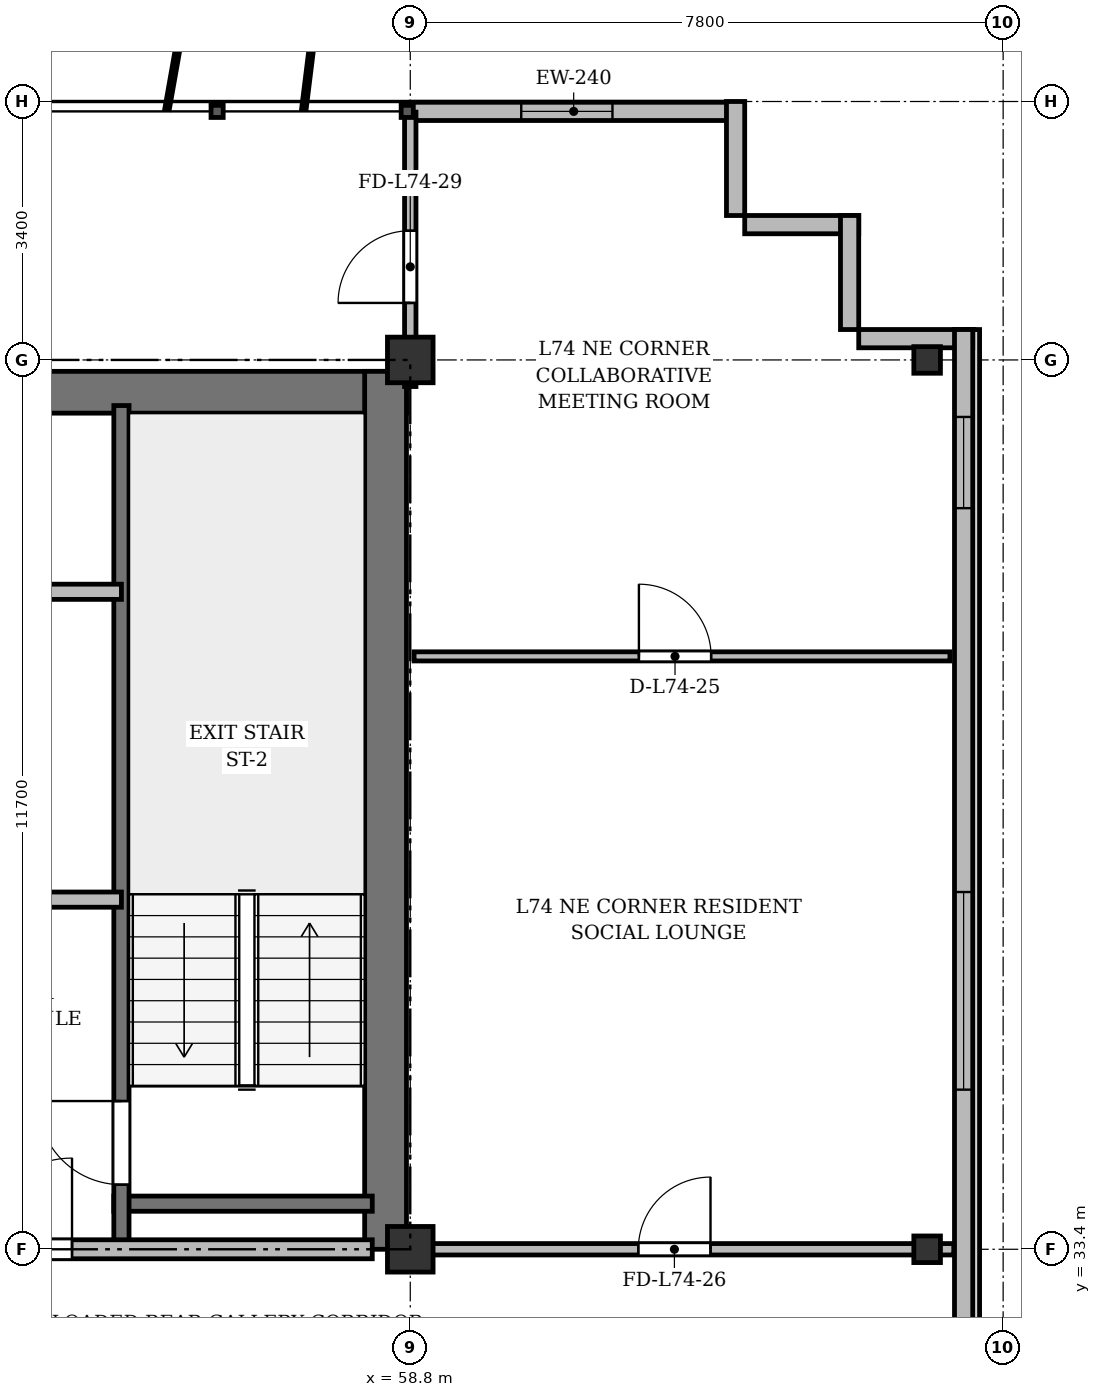
"""IFC4 building model, lengths in metres.
Left out: names, types, materials, properties, quantities, classifications, styles, units other than length and angle.
Written with IfcOpenShell. Run it as: python <this file> out.ifc"""

import sys

from ifc_helpers import new_model, si_unit, direction, frame, frame_2d, origin, origin_2d, place, context, subcontext, project, spatial, rectangle, i_section, extrude, source, transform, mapped, element, fill, save


model = new_model("IFC4")
c1 = context("Model", 3, precision=1e-05, world=origin(), true_north=direction((0.0, 1.0)))
c2 = subcontext(c1, "Body", "Model", "MODEL_VIEW")
j1 = project(units=[si_unit("LENGTHUNIT", "METRE"), si_unit("PLANEANGLEUNIT", "RADIAN")], contexts=[c1])
p1 = place(None, origin())
s1 = spatial("IfcSite", under=j1, at=p1, CompositionType="ELEMENT")
p2 = place(p1, origin())
s2 = spatial("IfcBuilding", under=s1, at=p2, CompositionType="ELEMENT")
p3 = place(p2, frame((0.0, 0.0, 284.7)))
s3 = spatial("IfcBuildingStorey", under=s2, at=p3, CompositionType="ELEMENT", Elevation=284.7)
m1 = source(origin(), c2, "Body", "SweptSolid", [
    extrude(rectangle(XDim=0.6, YDim=0.6, at=origin_2d()), origin(), (0.0, 0.0, 1.0), 3.6),
])
for number, where, z_axis, x_axis in (
    (1, (58.8, 33.4, 0.0), (0.0, 0.0, 1.0), (1.0, 0.0, 0.0)),
    (2, (58.8, 45.1, 0.0), (0.0, 0.0, 1.0), (1.0, 0.0, 0.0)),
):
    element("IfcColumn", number, at=place(p3, frame(where, z_axis=z_axis, x_axis=x_axis)), inside=s3, PredefinedType="COLUMN", context=c2, shape_type="MappedRepresentation", body=[
        mapped(m1, transform((0.0, 0.0, 0.0), x_axis=(1.0, 0.0, 0.0), y_axis=(0.0, 1.0, 0.0), z_axis=(0.0, 0.0, 1.0), scale=1.0)),
    ])
m2 = source(origin(), c2, "Body", "SweptSolid", [
    extrude(i_section(OverallWidth=0.35, OverallDepth=0.35, WebThickness=0.018, FlangeThickness=0.028, at=origin_2d()), origin(), (0.0, 0.0, 1.0), 3.6),
])
for number, where, z_axis, x_axis in (
    (3, (65.6, 33.4, 0.0), (0.0, 0.0, 1.0), (1.0, 0.0, 0.0)),
    (4, (65.6, 45.1, 0.0), (0.0, 0.0, 1.0), (1.0, 0.0, 0.0)),
):
    element("IfcColumn", number, at=place(p3, frame(where, z_axis=z_axis, x_axis=x_axis)), inside=s3, PredefinedType="COLUMN", context=c2, shape_type="MappedRepresentation", body=[
        mapped(m2, transform((0.0, 0.0, 0.0), x_axis=(1.0, 0.0, 0.0), y_axis=(0.0, 1.0, 0.0), z_axis=(0.0, 0.0, 1.0), scale=1.0)),
    ])
p4 = place(p3, frame((58.8, 48.37, 0.0), z_axis=(0.0, 0.0, 1.0), x_axis=(1.0, 0.0, 0.0)))
e5 = element("IfcWall", 5, at=p4, inside=s3, PredefinedType="SOLIDWALL", context=c2, shape_type="SweptSolid", body=[
    extrude(rectangle(XDim=4.3, YDim=0.24, at=frame_2d((2.15, 0.0))), origin(), (0.0, 0.0, 1.0), 3.37),
])
p5 = place(p4, frame((1.46, 0.0, 0.9)))
e6 = element("IfcOpeningElement", 6, at=p5, cuts=e5, PredefinedType="OPENING", context=c2, shape_type="SweptSolid", body=[
    extrude(rectangle(XDim=1.2, YDim=1.65, at=frame_2d((0.6, 0.825))), frame((0.0, 0.13, 0.0), z_axis=(0.0, -1.0, 0.0), x_axis=(1.0, 0.0, 0.0)), (0.0, 0.0, 1.0), 0.26),
])
for number, where, z_axis, x_axis in (
    (7, (63.08, 48.5, 0.0), (0.0, 0.0, 1.0), (0.0, -1.0, 0.0)),
    (8, (63.2, 46.88, 0.0), (0.0, 0.0, 1.0), (1.0, 0.0, 0.0)),
    (9, (64.58, 47.0, 0.0), (0.0, 0.0, 1.0), (0.0, -1.0, 0.0)),
    (10, (64.7, 45.38, 0.0), (0.0, 0.0, 1.0), (1.0, 0.0, 0.0)),
):
    element("IfcWall", number, at=place(p3, frame(where, z_axis=z_axis, x_axis=x_axis)), inside=s3, PredefinedType="SOLIDWALL", context=c2, shape_type="SweptSolid", body=[
        extrude(rectangle(XDim=1.5, YDim=0.24, at=frame_2d((0.75, 0.0))), origin(), (0.0, 0.0, 1.0), 3.37),
    ])
p6 = place(p3, frame((66.08, 45.5, 0.0), z_axis=(0.0, 0.0, 1.0), x_axis=(0.0, -1.0, 0.0)))
e11 = element("IfcWall", 11, at=p6, inside=s3, PredefinedType="SOLIDWALL", context=c2, shape_type="SweptSolid", body=[
    extrude(rectangle(XDim=39.0, YDim=0.24, at=frame_2d((19.5, 0.0))), origin(), (0.0, 0.0, 1.0), 3.37),
])
p7 = place(p6, frame((36.35, 0.0, 0.92)))
e12 = element("IfcOpeningElement", 12, at=p7, cuts=e11, PredefinedType="OPENING", context=c2, shape_type="SweptSolid", body=[
    extrude(rectangle(XDim=1.2, YDim=1.65, at=frame_2d((0.6, 0.825))), frame((0.0, 0.13, 0.0), z_axis=(0.0, -1.0, 0.0), x_axis=(1.0, 0.0, 0.0)), (0.0, 0.0, 1.0), 0.26),
])
p8 = place(p6, frame((32.8, 0.0, 0.92)))
e13 = element("IfcOpeningElement", 13, at=p8, cuts=e11, PredefinedType="OPENING", context=c2, shape_type="SweptSolid", body=[
    extrude(rectangle(XDim=2.6, YDim=1.9, at=frame_2d((1.3, 0.95))), frame((0.0, 0.13, 0.0), z_axis=(0.0, -1.0, 0.0), x_axis=(1.0, 0.0, 0.0)), (0.0, 0.0, 1.0), 0.26),
])
p9 = place(p6, frame((21.4, 0.0, 0.92)))
e14 = element("IfcOpeningElement", 14, at=p9, cuts=e11, PredefinedType="OPENING", context=c2, shape_type="SweptSolid", body=[
    extrude(rectangle(XDim=2.6, YDim=1.9, at=frame_2d((1.3, 0.95))), frame((0.0, 0.13, 0.0), z_axis=(0.0, -1.0, 0.0), x_axis=(1.0, 0.0, 0.0)), (0.0, 0.0, 1.0), 0.26),
])
p10 = place(p6, frame((7.4, 0.0, 0.92)))
e15 = element("IfcOpeningElement", 15, at=p10, cuts=e11, PredefinedType="OPENING", context=c2, shape_type="SweptSolid", body=[
    extrude(rectangle(XDim=2.6, YDim=1.9, at=frame_2d((1.3, 0.95))), frame((0.0, 0.13, 0.0), z_axis=(0.0, -1.0, 0.0), x_axis=(1.0, 0.0, 0.0)), (0.0, 0.0, 1.0), 0.26),
])
p11 = place(p6, frame((1.15, 0.0, 0.92)))
e16 = element("IfcOpeningElement", 16, at=p11, cuts=e11, PredefinedType="OPENING", context=c2, shape_type="SweptSolid", body=[
    extrude(rectangle(XDim=1.2, YDim=1.65, at=frame_2d((0.6, 0.825))), frame((0.0, 0.13, 0.0), z_axis=(0.0, -1.0, 0.0), x_axis=(1.0, 0.0, 0.0)), (0.0, 0.0, 1.0), 0.26),
])
p12 = place(p3, frame((15.65, 44.675, 0.0), z_axis=(0.0, 0.0, 1.0), x_axis=(1.0, 0.0, 0.0)))
e17 = element("IfcWall", 17, at=p12, inside=s3, PredefinedType="SHEAR", context=c2, shape_type="SweptSolid", body=[
    extrude(rectangle(XDim=43.1, YDim=0.55, at=frame_2d((21.55, 0.0))), origin(), (0.0, 0.0, 1.0), 3.37),
])
p13 = place(p3, frame((58.475, 33.4, 0.0), z_axis=(0.0, 0.0, 1.0), x_axis=(0.0, 1.0, 0.0)))
e18 = element("IfcWall", 18, at=p13, inside=s3, PredefinedType="SHEAR", context=c2, shape_type="SweptSolid", body=[
    extrude(rectangle(XDim=11.55, YDim=0.55, at=frame_2d((5.775, 0.0))), origin(), (0.0, 0.0, 1.0), 3.37),
])
p14 = place(p3, frame((54.9, 34.0, 0.0), z_axis=(0.0, 0.0, 1.0), x_axis=(1.0, 0.0, 0.0)))
e19 = element("IfcWall", 19, at=p14, inside=s3, PredefinedType="SHEAR", context=c2, shape_type="SweptSolid", body=[
    extrude(rectangle(XDim=3.4, YDim=0.2, at=frame_2d((1.7, 0.0))), origin(), (0.0, 0.0, 1.0), 3.37),
])
p15 = place(p3, frame((55.0, 33.4, 0.0), z_axis=(0.0, 0.0, 1.0), x_axis=(0.0, 1.0, 0.0)))
e20 = element("IfcWall", 20, at=p15, inside=s3, PredefinedType="SHEAR", context=c2, shape_type="SweptSolid", body=[
    extrude(rectangle(XDim=11.1, YDim=0.2, at=frame_2d((5.55, 0.0))), origin(), (0.0, 0.0, 1.0), 3.37),
])
p16 = place(p15, frame((0.85, 0.0, 0.0)))
e21 = element("IfcOpeningElement", 21, at=p16, cuts=e20, PredefinedType="OPENING", context=c2, shape_type="SweptSolid", body=[
    extrude(rectangle(XDim=1.1, YDim=2.15, at=frame_2d((0.55, 1.075))), frame((0.0, 0.11, 0.0), z_axis=(0.0, -1.0, 0.0), x_axis=(1.0, 0.0, 0.0)), (0.0, 0.0, 1.0), 0.22),
])
p17 = place(p3, frame((47.15, 42.05, 0.0), z_axis=(0.0, 0.0, 1.0), x_axis=(1.0, 0.0, 0.0)))
e22 = element("IfcWall", 22, at=p17, inside=s3, PredefinedType="SOLIDWALL", context=c2, shape_type="SweptSolid", body=[
    extrude(rectangle(XDim=7.85, YDim=0.2, at=frame_2d((3.925, 0.0))), origin(), (0.0, 0.0, 1.0), 2.87),
])
p18 = place(p17, frame((0.75, 0.0, 0.0)))
e23 = element("IfcOpeningElement", 23, at=p18, cuts=e22, PredefinedType="OPENING", context=c2, shape_type="SweptSolid", body=[
    extrude(rectangle(XDim=0.9, YDim=2.1, at=frame_2d((0.45, 1.05))), frame((0.0, 0.11, 0.0), z_axis=(0.0, -1.0, 0.0), x_axis=(1.0, 0.0, 0.0)), (0.0, 0.0, 1.0), 0.22),
])
p19 = place(p17, frame((3.85, 0.0, 0.0)))
e24 = element("IfcOpeningElement", 24, at=p19, cuts=e22, PredefinedType="OPENING", context=c2, shape_type="SweptSolid", body=[
    extrude(rectangle(XDim=0.9, YDim=2.1, at=frame_2d((0.45, 1.05))), frame((0.0, 0.11, 0.0), z_axis=(0.0, -1.0, 0.0), x_axis=(1.0, 0.0, 0.0)), (0.0, 0.0, 1.0), 0.22),
])
p20 = place(p3, frame((52.45, 38.0, 0.0), z_axis=(0.0, 0.0, 1.0), x_axis=(1.0, 0.0, 0.0)))
e25 = element("IfcWall", 25, at=p20, inside=s3, PredefinedType="PARTITIONING", context=c2, shape_type="SweptSolid", body=[
    extrude(rectangle(XDim=2.55, YDim=0.2, at=frame_2d((1.275, 0.0))), origin(), (0.0, 0.0, 1.0), 3.37),
])
p21 = place(p3, frame((47.15, 33.4, 0.0), z_axis=(0.0, 0.0, 1.0), x_axis=(1.0, 0.0, 0.0)))
e26 = element("IfcWall", 26, at=p21, inside=s3, PredefinedType="PARTITIONING", context=c2, shape_type="SweptSolid", body=[
    extrude(rectangle(XDim=11.15, YDim=0.25, at=frame_2d((5.575, 0.0))), origin(), (0.0, 0.0, 1.0), 2.92),
])
p22 = place(p21, frame((0.7, 0.0, 0.0)))
e27 = element("IfcOpeningElement", 27, at=p22, cuts=e26, PredefinedType="OPENING", context=c2, shape_type="SweptSolid", body=[
    extrude(rectangle(XDim=0.95, YDim=2.15, at=frame_2d((0.475, 1.075))), frame((0.0, 0.135, 0.0), z_axis=(0.0, -1.0, 0.0), x_axis=(1.0, 0.0, 0.0)), (0.0, 0.0, 1.0), 0.27),
])
p23 = place(p21, frame((6.0, 0.0, 0.0)))
e28 = element("IfcOpeningElement", 28, at=p23, cuts=e26, PredefinedType="OPENING", context=c2, shape_type="SweptSolid", body=[
    extrude(rectangle(XDim=1.2, YDim=2.15, at=frame_2d((0.6, 1.075))), frame((0.0, 0.135, 0.0), z_axis=(0.0, -1.0, 0.0), x_axis=(1.0, 0.0, 0.0)), (0.0, 0.0, 1.0), 0.27),
])
p24 = place(p3, frame((58.85, 41.2, 0.0), z_axis=(0.0, 0.0, 1.0), x_axis=(1.0, 0.0, 0.0)))
e29 = element("IfcWall", 29, at=p24, inside=s3, PredefinedType="PARTITIONING", context=c2, shape_type="SweptSolid", body=[
    extrude(rectangle(XDim=7.05, YDim=0.12, at=frame_2d((3.525, 0.0))), origin(), (0.0, 0.0, 1.0), 2.87),
])
p25 = place(p24, frame((2.958, 0.0, 0.0)))
e30 = element("IfcOpeningElement", 30, at=p25, cuts=e29, PredefinedType="OPENING", context=c2, shape_type="SweptSolid", body=[
    extrude(rectangle(XDim=0.95, YDim=2.15, at=frame_2d((0.475, 1.075))), frame((0.0, 0.07, 0.0), z_axis=(0.0, -1.0, 0.0), x_axis=(1.0, 0.0, 0.0)), (0.0, 0.0, 1.0), 0.14),
])
p26 = place(p3, frame((58.8, 33.4, 0.0), z_axis=(0.0, 0.0, 1.0), x_axis=(1.0, 0.0, 0.0)))
e31 = element("IfcWall", 31, at=p26, inside=s3, PredefinedType="PARTITIONING", context=c2, shape_type="SweptSolid", body=[
    extrude(rectangle(XDim=7.15, YDim=0.15, at=frame_2d((3.575, 0.0))), origin(), (0.0, 0.0, 1.0), 2.92),
])
p27 = place(p26, frame((3.0, 0.0, 0.0)))
e32 = element("IfcOpeningElement", 32, at=p27, cuts=e31, PredefinedType="OPENING", context=c2, shape_type="SweptSolid", body=[
    extrude(rectangle(XDim=0.95, YDim=2.15, at=frame_2d((0.475, 1.075))), frame((0.0, 0.085, 0.0), z_axis=(0.0, -1.0, 0.0), x_axis=(1.0, 0.0, 0.0)), (0.0, 0.0, 1.0), 0.17),
])
p28 = place(p3, frame((58.8, 44.75, 0.0), z_axis=(0.0, 0.0, 1.0), x_axis=(0.0, 1.0, 0.0)))
e33 = element("IfcWall", 33, at=p28, inside=s3, PredefinedType="PARTITIONING", context=c2, shape_type="SweptSolid", body=[
    extrude(rectangle(XDim=3.61, YDim=0.15, at=frame_2d((1.805, 0.0))), origin(), (0.0, 0.0, 1.0), 2.87),
])
p29 = place(p28, frame((1.1, 0.0, 0.0)))
e34 = element("IfcOpeningElement", 34, at=p29, cuts=e33, PredefinedType="OPENING", context=c2, shape_type="SweptSolid", body=[
    extrude(rectangle(XDim=0.95, YDim=2.15, at=frame_2d((0.475, 1.075))), frame((0.0, 0.085, 0.0), z_axis=(0.0, -1.0, 0.0), x_axis=(1.0, 0.0, 0.0)), (0.0, 0.0, 1.0), 0.17),
])
m3 = source(origin(), c2, "Body", "SweptSolid", [
    extrude(rectangle(XDim=1.2, YDim=1.65, at=frame_2d((0.6, 0.825))), frame((0.0, 0.03, 0.0), z_axis=(0.0, -1.0, 0.0), x_axis=(1.0, 0.0, 0.0)), (0.0, 0.0, 1.0), 0.06),
])
p30 = place(p5, origin())
e35 = element("IfcWindow", 35, at=p30, inside=s3, PartitioningType="SINGLE_PANEL", PredefinedType="WINDOW", context=c2, shape_type="MappedRepresentation", body=[
    mapped(m3, transform((0.0, 0.0, 0.0), x_axis=(1.0, 0.0, 0.0), y_axis=(0.0, 1.0, 0.0), z_axis=(0.0, 0.0, 1.0), scale=1.0)),
])
fill(e6, e35)
m4 = source(origin(), c2, "Body", "SweptSolid", [
    extrude(rectangle(XDim=2.6, YDim=1.9, at=frame_2d((1.3, 0.95))), frame((0.0, 0.03, 0.0), z_axis=(0.0, -1.0, 0.0), x_axis=(1.0, 0.0, 0.0)), (0.0, 0.0, 1.0), 0.06),
])
p31 = place(p10, origin())
e36 = element("IfcWindow", 36, at=p31, inside=s3, PartitioningType="SINGLE_PANEL", PredefinedType="WINDOW", context=c2, shape_type="MappedRepresentation", body=[
    mapped(m4, transform((0.0, 0.0, 0.0), x_axis=(1.0, 0.0, 0.0), y_axis=(0.0, 1.0, 0.0), z_axis=(0.0, 0.0, 1.0), scale=1.0)),
])
fill(e15, e36)
p32 = place(p11, origin())
e37 = element("IfcWindow", 37, at=p32, inside=s3, PartitioningType="SINGLE_PANEL", PredefinedType="WINDOW", context=c2, shape_type="MappedRepresentation", body=[
    mapped(m3, transform((0.0, 0.0, 0.0), x_axis=(1.0, 0.0, 0.0), y_axis=(0.0, 1.0, 0.0), z_axis=(0.0, 0.0, 1.0), scale=1.0)),
])
fill(e16, e37)
m5 = source(origin(), c2, "Body", "SweptSolid", [
    extrude(rectangle(XDim=1.1, YDim=2.15, at=frame_2d((0.55, 1.075))), frame((0.0, 0.025, 0.0), z_axis=(0.0, -1.0, 0.0), x_axis=(1.0, 0.0, 0.0)), (0.0, 0.0, 1.0), 0.05),
])
p33 = place(p16, origin())
e38 = element("IfcDoor", 38, at=p33, inside=s3, OperationType="SINGLE_SWING_RIGHT", PredefinedType="DOOR", context=c2, shape_type="MappedRepresentation", body=[
    mapped(m5, transform((0.0, 0.0, 0.0), x_axis=(1.0, 0.0, 0.0), y_axis=(0.0, 1.0, 0.0), z_axis=(0.0, 0.0, 1.0), scale=1.0)),
])
fill(e21, e38)
m6 = source(origin(), c2, "Body", "SweptSolid", [
    extrude(rectangle(XDim=1.2, YDim=2.15, at=frame_2d((0.6, 1.075))), frame((0.0, 0.025, 0.0), z_axis=(0.0, -1.0, 0.0), x_axis=(1.0, 0.0, 0.0)), (0.0, 0.0, 1.0), 0.05),
])
p34 = place(p23, origin())
e39 = element("IfcDoor", 39, at=p34, inside=s3, OperationType="SINGLE_SWING_RIGHT", PredefinedType="DOOR", context=c2, shape_type="MappedRepresentation", body=[
    mapped(m6, transform((0.0, 0.0, 0.0), x_axis=(1.0, 0.0, 0.0), y_axis=(0.0, 1.0, 0.0), z_axis=(0.0, 0.0, 1.0), scale=1.0)),
])
fill(e28, e39)
m7 = source(origin(), c2, "Body", "SweptSolid", [
    extrude(rectangle(XDim=0.95, YDim=2.15, at=frame_2d((0.475, 1.075))), frame((0.0, 0.025, 0.0), z_axis=(0.0, -1.0, 0.0), x_axis=(1.0, 0.0, 0.0)), (0.0, 0.0, 1.0), 0.05),
])
p35 = place(p25, origin())
e40 = element("IfcDoor", 40, at=p35, inside=s3, OperationType="SINGLE_SWING_LEFT", PredefinedType="DOOR", context=c2, shape_type="MappedRepresentation", body=[
    mapped(m7, transform((0.0, 0.0, 0.0), x_axis=(1.0, 0.0, 0.0), y_axis=(0.0, 1.0, 0.0), z_axis=(0.0, 0.0, 1.0), scale=1.0)),
])
fill(e30, e40)
p36 = place(p27, origin())
e41 = element("IfcDoor", 41, at=p36, inside=s3, OperationType="SINGLE_SWING_RIGHT", PredefinedType="DOOR", context=c2, shape_type="MappedRepresentation", body=[
    mapped(m7, transform((0.0, 0.0, 0.0), x_axis=(1.0, 0.0, 0.0), y_axis=(0.0, 1.0, 0.0), z_axis=(0.0, 0.0, 1.0), scale=1.0)),
])
fill(e32, e41)
p37 = place(p29, origin())
e42 = element("IfcDoor", 42, at=p37, inside=s3, OperationType="SINGLE_SWING_LEFT", PredefinedType="DOOR", context=c2, shape_type="MappedRepresentation", body=[
    mapped(m7, transform((0.0, 0.0, 0.0), x_axis=(1.0, 0.0, 0.0), y_axis=(0.0, 1.0, 0.0), z_axis=(0.0, 0.0, 1.0), scale=1.0)),
])
fill(e34, e42)
save(model, sys.argv[1])
